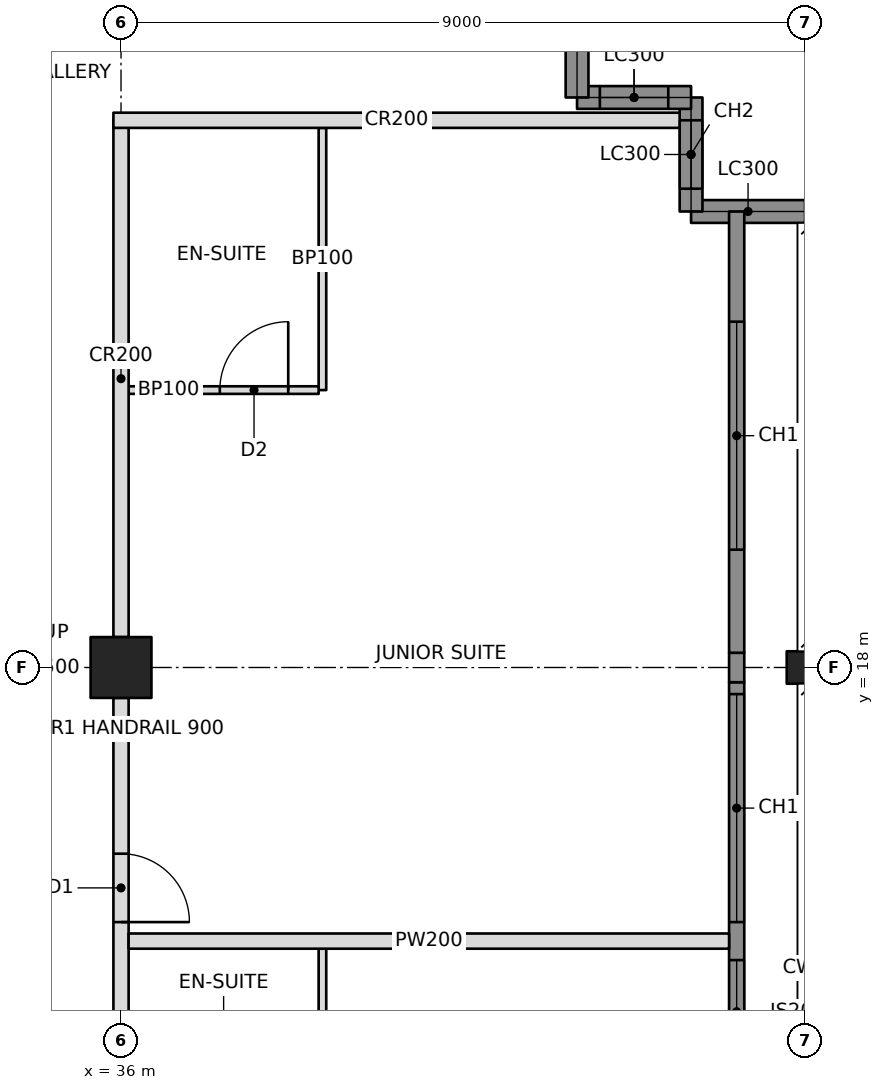
"""IFC4 building model, lengths in metres.
Left out: names, types, materials, properties, quantities, classifications, styles, units other than length and angle.
Written with IfcOpenShell. Run it as: python <this file> out.ifc"""

import sys

from ifc_helpers import new_model, si_unit, direction, frame, frame_2d, origin, origin_2d, place, context, subcontext, project, spatial, rectangle, hollow_rectangle, i_section, extrude, element, fill, save


model = new_model("IFC4")
c1 = context("Model", 3, precision=1e-05, world=origin(), true_north=direction((0.0, 1.0)))
c2 = subcontext(c1, "Body", "Model", "MODEL_VIEW")
j1 = project(units=[si_unit("LENGTHUNIT", "METRE"), si_unit("PLANEANGLEUNIT", "RADIAN")], contexts=[c1])
p1 = place(None, origin())
s1 = spatial("IfcSite", under=j1, at=p1, CompositionType="ELEMENT")
p2 = place(p1, origin())
s2 = spatial("IfcBuilding", under=s1, at=p2, CompositionType="ELEMENT")
p3 = place(p2, frame((0.0, 0.0, 211.4)))
s3 = spatial("IfcBuildingStorey", under=s2, at=p3, CompositionType="ELEMENT", Elevation=211.4)
p4 = place(p3, frame((36.0, 18.0, 0.0), z_axis=(0.0, 0.0, 1.0), x_axis=(0.0, 1.0, 0.0)))
e1 = element("IfcColumn", 1, at=p4, inside=s3, PredefinedType="COLUMN", context=c2, shape_type="SweptSolid", body=[
    extrude(hollow_rectangle(XDim=0.8, YDim=0.8, WallThickness=0.05, at=origin_2d()), origin(), (0.0, 0.0, 1.0), 3.4),
])
p5 = place(p3, frame((45.0, 18.0, 0.0), z_axis=(0.0, 0.0, 1.0), x_axis=(0.0, 1.0, 0.0)))
e2 = element("IfcColumn", 2, at=p5, inside=s3, PredefinedType="COLUMN", context=c2, shape_type="SweptSolid", body=[
    extrude(i_section(OverallWidth=0.427, OverallDepth=0.483, WebThickness=0.051, FlangeThickness=0.082, at=origin_2d()), origin(), (0.0, 0.0, 1.0), 3.4),
])
p6 = place(p3, frame((45.0, 24.0, 0.0), z_axis=(0.0, 0.0, 1.0), x_axis=(-1.0, 0.0, 0.0)))
e3 = element("IfcWall", 3, at=p6, inside=s3, PredefinedType="SOLIDWALL", context=c2, shape_type="SweptSolid", body=[
    extrude(rectangle(XDim=1.5, YDim=0.3, at=frame_2d((0.75, 0.0))), origin(), (0.0, 0.0, 1.0), 2.42),
])
p7 = place(p3, frame((43.5, 24.0, 0.0), z_axis=(0.0, 0.0, 1.0), x_axis=(0.0, 1.0, 0.0)))
e4 = element("IfcWall", 4, at=p7, inside=s3, PredefinedType="SOLIDWALL", context=c2, shape_type="SweptSolid", body=[
    extrude(rectangle(XDim=1.5, YDim=0.3, at=frame_2d((0.75, 0.0))), origin(), (0.0, 0.0, 1.0), 3.2),
])
p8 = place(p7, frame((0.3, 0.0, 0.6)))
e5 = element("IfcOpeningElement", 5, at=p8, cuts=e4, PredefinedType="OPENING", context=c2, shape_type="SweptSolid", body=[
    extrude(rectangle(XDim=0.9, YDim=2.2, at=frame_2d((0.45, 1.1))), frame((0.0, 0.16, 0.0), z_axis=(0.0, -1.0, 0.0), x_axis=(1.0, 0.0, 0.0)), (0.0, 0.0, 1.0), 0.32),
])
p9 = place(p3, frame((43.5, 25.5, 0.0), z_axis=(0.0, 0.0, 1.0), x_axis=(-1.0, 0.0, 0.0)))
e6 = element("IfcWall", 6, at=p9, inside=s3, PredefinedType="SOLIDWALL", context=c2, shape_type="SweptSolid", body=[
    extrude(rectangle(XDim=1.5, YDim=0.3, at=frame_2d((0.75, 0.0))), origin(), (0.0, 0.0, 1.0), 3.2),
])
p10 = place(p9, frame((0.3, 0.0, 0.6)))
e7 = element("IfcOpeningElement", 7, at=p10, cuts=e6, PredefinedType="OPENING", context=c2, shape_type="SweptSolid", body=[
    extrude(rectangle(XDim=0.9, YDim=2.2, at=frame_2d((0.45, 1.1))), frame((0.0, 0.16, 0.0), z_axis=(0.0, -1.0, 0.0), x_axis=(1.0, 0.0, 0.0)), (0.0, 0.0, 1.0), 0.32),
])
p11 = place(p3, frame((42.0, 25.5, 0.0), z_axis=(0.0, 0.0, 1.0), x_axis=(0.0, 1.0, 0.0)))
e8 = element("IfcWall", 8, at=p11, inside=s3, PredefinedType="SOLIDWALL", context=c2, shape_type="SweptSolid", body=[
    extrude(rectangle(XDim=1.5, YDim=0.3, at=frame_2d((0.75, 0.0))), origin(), (0.0, 0.0, 1.0), 2.42),
])
p12 = place(p3, frame((36.0, 10.8, 0.0), z_axis=(0.0, 0.0, 1.0), x_axis=(0.0, 1.0, 0.0)))
e9 = element("IfcWall", 9, at=p12, inside=s3, PredefinedType="PARTITIONING", context=c2, shape_type="SweptSolid", body=[
    extrude(rectangle(XDim=6.8, YDim=0.2, at=frame_2d((3.4, 0.0))), origin(), (0.0, 0.0, 1.0), 2.405),
])
p13 = place(p12, frame((0.25, 0.0, 0.0)))
e10 = element("IfcOpeningElement", 10, at=p13, cuts=e9, PredefinedType="OPENING", context=c2, shape_type="SweptSolid", body=[
    extrude(rectangle(XDim=0.9, YDim=2.1, at=frame_2d((0.45, 1.05))), frame((0.0, 0.11, 0.0), z_axis=(0.0, -1.0, 0.0), x_axis=(1.0, 0.0, 0.0)), (0.0, 0.0, 1.0), 0.22),
])
p14 = place(p12, frame((3.85, 0.0, 0.0)))
e11 = element("IfcOpeningElement", 11, at=p14, cuts=e9, PredefinedType="OPENING", context=c2, shape_type="SweptSolid", body=[
    extrude(rectangle(XDim=0.9, YDim=2.1, at=frame_2d((0.45, 1.05))), frame((0.0, 0.11, 0.0), z_axis=(0.0, -1.0, 0.0), x_axis=(1.0, 0.0, 0.0)), (0.0, 0.0, 1.0), 0.22),
])
p15 = place(p3, frame((36.0, 18.4, 0.0), z_axis=(0.0, 0.0, 1.0), x_axis=(0.0, 1.0, 0.0)))
e12 = element("IfcWall", 12, at=p15, inside=s3, PredefinedType="PARTITIONING", context=c2, shape_type="SweptSolid", body=[
    extrude(rectangle(XDim=6.8, YDim=0.2, at=frame_2d((3.4, 0.0))), origin(), (0.0, 0.0, 1.0), 2.405),
])
p16 = place(p3, frame((35.9, 25.2, 0.0), z_axis=(0.0, 0.0, 1.0), x_axis=(1.0, 0.0, 0.0)))
e13 = element("IfcWall", 13, at=p16, inside=s3, PredefinedType="PARTITIONING", context=c2, shape_type="SweptSolid", body=[
    extrude(rectangle(XDim=7.45, YDim=0.2, at=frame_2d((3.725, 0.0))), origin(), (0.0, 0.0, 1.0), 2.404),
])
p17 = place(p3, frame((36.1, 14.4, 0.0), z_axis=(0.0, 0.0, 1.0), x_axis=(1.0, 0.0, 0.0)))
e14 = element("IfcWall", 14, at=p17, inside=s3, PredefinedType="PARTITIONING", context=c2, shape_type="SweptSolid", body=[
    extrude(rectangle(XDim=7.9, YDim=0.2, at=frame_2d((3.95, 0.0))), origin(), (0.0, 0.0, 1.0), 2.404),
])
p18 = place(p3, frame((38.65, 12.25, 0.0), z_axis=(0.0, 0.0, 1.0), x_axis=(0.0, 1.0, 0.0)))
e15 = element("IfcWall", 15, at=p18, inside=s3, PredefinedType="PARTITIONING", context=c2, shape_type="SweptSolid", body=[
    extrude(rectangle(XDim=2.05, YDim=0.1, at=frame_2d((1.025, 0.0))), origin(), (0.0, 0.0, 1.0), 3.2),
])
p19 = place(p3, frame((38.65, 21.65, 0.0), z_axis=(0.0, 0.0, 1.0), x_axis=(0.0, 1.0, 0.0)))
e16 = element("IfcWall", 16, at=p19, inside=s3, PredefinedType="PARTITIONING", context=c2, shape_type="SweptSolid", body=[
    extrude(rectangle(XDim=3.45, YDim=0.1, at=frame_2d((1.725, 0.0))), origin(), (0.0, 0.0, 1.0), 3.2),
])
p20 = place(p3, frame((36.1, 21.65, 0.0), z_axis=(0.0, 0.0, 1.0), x_axis=(1.0, 0.0, 0.0)))
e17 = element("IfcWall", 17, at=p20, inside=s3, PredefinedType="PARTITIONING", context=c2, shape_type="SweptSolid", body=[
    extrude(rectangle(XDim=2.5, YDim=0.1, at=frame_2d((1.25, 0.0))), origin(), (0.0, 0.0, 1.0), 2.404),
])
p21 = place(p20, frame((1.2, 0.0, 0.0)))
e18 = element("IfcOpeningElement", 18, at=p21, cuts=e17, PredefinedType="OPENING", context=c2, shape_type="SweptSolid", body=[
    extrude(rectangle(XDim=0.9, YDim=2.1, at=frame_2d((0.45, 1.05))), frame((0.0, 0.06, 0.0), z_axis=(0.0, -1.0, 0.0), x_axis=(1.0, 0.0, 0.0)), (0.0, 0.0, 1.0), 0.12),
])
p22 = place(p3, frame((44.1, 9.135, 0.0), z_axis=(0.0, 0.0, 1.0), x_axis=(0.0, 1.0, 0.0)))
e19 = element("IfcWall", 19, at=p22, inside=s3, PredefinedType="SOLIDWALL", context=c2, shape_type="SweptSolid", body=[
    extrude(rectangle(XDim=8.671, YDim=0.2, at=frame_2d((4.335, 0.0))), origin(), (0.0, 0.0, 1.0), 3.2),
])
p23 = place(p22, frame((2.015, 0.0, 0.6)))
e20 = element("IfcOpeningElement", 20, at=p23, cuts=e19, PredefinedType="OPENING", context=c2, shape_type="SweptSolid", body=[
    extrude(rectangle(XDim=3.0, YDim=2.2, at=frame_2d((1.5, 1.1))), frame((0.0, 0.11, 0.0), z_axis=(0.0, -1.0, 0.0), x_axis=(1.0, 0.0, 0.0)), (0.0, 0.0, 1.0), 0.22),
])
p24 = place(p22, frame((5.515, 0.0, 0.6)))
e21 = element("IfcOpeningElement", 21, at=p24, cuts=e19, PredefinedType="OPENING", context=c2, shape_type="SweptSolid", body=[
    extrude(rectangle(XDim=3.0, YDim=2.2, at=frame_2d((1.5, 1.1))), frame((0.0, 0.11, 0.0), z_axis=(0.0, -1.0, 0.0), x_axis=(1.0, 0.0, 0.0)), (0.0, 0.0, 1.0), 0.22),
])
p25 = place(p3, frame((44.1, 17.806, 0.0), z_axis=(0.0, 0.0, 1.0), x_axis=(0.0, 1.0, 0.0)))
e22 = element("IfcWall", 22, at=p25, inside=s3, PredefinedType="SOLIDWALL", context=c2, shape_type="SweptSolid", body=[
    extrude(rectangle(XDim=0.388, YDim=0.2, at=frame_2d((0.194, 0.0))), origin(), (0.0, 0.0, 1.0), 2.404),
])
p26 = place(p3, frame((44.1, 18.194, 0.0), z_axis=(0.0, 0.0, 1.0), x_axis=(0.0, 1.0, 0.0)))
e23 = element("IfcWall", 23, at=p26, inside=s3, PredefinedType="SOLIDWALL", context=c2, shape_type="SweptSolid", body=[
    extrude(rectangle(XDim=5.806, YDim=0.2, at=frame_2d((2.903, 0.0))), origin(), (0.0, 0.0, 1.0), 3.2),
])
p27 = place(p26, frame((1.356, 0.0, 0.6)))
e24 = element("IfcOpeningElement", 24, at=p27, cuts=e23, PredefinedType="OPENING", context=c2, shape_type="SweptSolid", body=[
    extrude(rectangle(XDim=3.0, YDim=2.2, at=frame_2d((1.5, 1.1))), frame((0.0, 0.11, 0.0), z_axis=(0.0, -1.0, 0.0), x_axis=(1.0, 0.0, 0.0)), (0.0, 0.0, 1.0), 0.22),
])
p28 = place(p8, origin())
e25 = element("IfcWindow", 25, at=p28, inside=s3, PartitioningType="SINGLE_PANEL", PredefinedType="WINDOW", context=c2, shape_type="SweptSolid", body=[
    extrude(rectangle(XDim=0.9, YDim=2.2, at=frame_2d((0.45, 1.1))), frame((0.0, 0.03, 0.0), z_axis=(0.0, -1.0, 0.0), x_axis=(1.0, 0.0, 0.0)), (0.0, 0.0, 1.0), 0.06),
])
fill(e5, e25)
p29 = place(p10, origin())
e26 = element("IfcWindow", 26, at=p29, inside=s3, PartitioningType="SINGLE_PANEL", PredefinedType="WINDOW", context=c2, shape_type="SweptSolid", body=[
    extrude(rectangle(XDim=0.9, YDim=2.2, at=frame_2d((0.45, 1.1))), frame((0.0, 0.03, 0.0), z_axis=(0.0, -1.0, 0.0), x_axis=(1.0, 0.0, 0.0)), (0.0, 0.0, 1.0), 0.06),
])
fill(e7, e26)
p30 = place(p23, origin())
e27 = element("IfcWindow", 27, at=p30, inside=s3, PartitioningType="TRIPLE_PANEL_VERTICAL", PredefinedType="WINDOW", context=c2, shape_type="SweptSolid", body=[
    extrude(rectangle(XDim=3.0, YDim=2.2, at=frame_2d((1.5, 1.1))), frame((0.0, 0.03, 0.0), z_axis=(0.0, -1.0, 0.0), x_axis=(1.0, 0.0, 0.0)), (0.0, 0.0, 1.0), 0.06),
])
fill(e20, e27)
p31 = place(p24, origin())
e28 = element("IfcWindow", 28, at=p31, inside=s3, PartitioningType="TRIPLE_PANEL_VERTICAL", PredefinedType="WINDOW", context=c2, shape_type="SweptSolid", body=[
    extrude(rectangle(XDim=3.0, YDim=2.2, at=frame_2d((1.5, 1.1))), frame((0.0, 0.03, 0.0), z_axis=(0.0, -1.0, 0.0), x_axis=(1.0, 0.0, 0.0)), (0.0, 0.0, 1.0), 0.06),
])
fill(e21, e28)
p32 = place(p27, origin())
e29 = element("IfcWindow", 29, at=p32, inside=s3, PartitioningType="TRIPLE_PANEL_VERTICAL", PredefinedType="WINDOW", context=c2, shape_type="SweptSolid", body=[
    extrude(rectangle(XDim=3.0, YDim=2.2, at=frame_2d((1.5, 1.1))), frame((0.0, 0.03, 0.0), z_axis=(0.0, -1.0, 0.0), x_axis=(1.0, 0.0, 0.0)), (0.0, 0.0, 1.0), 0.06),
])
fill(e24, e29)
p33 = place(p21, origin())
e30 = element("IfcDoor", 30, at=p33, inside=s3, OperationType="SINGLE_SWING_RIGHT", PredefinedType="DOOR", context=c2, shape_type="SweptSolid", body=[
    extrude(rectangle(XDim=0.9, YDim=2.1, at=frame_2d((0.45, 1.05))), frame((0.0, 0.025, 0.0), z_axis=(0.0, -1.0, 0.0), x_axis=(1.0, 0.0, 0.0)), (0.0, 0.0, 1.0), 0.05),
])
fill(e18, e30)
p34 = place(p14, frame((0.9, 0.0, 0.0), z_axis=(0.0, 0.0, 1.0), x_axis=(-1.0, 0.0, 0.0)))
e31 = element("IfcDoor", 31, at=p34, inside=s3, OperationType="SINGLE_SWING_RIGHT", PredefinedType="DOOR", context=c2, shape_type="SweptSolid", body=[
    extrude(rectangle(XDim=0.9, YDim=2.1, at=frame_2d((0.45, 1.05))), frame((0.0, 0.025, 0.0), z_axis=(0.0, -1.0, 0.0), x_axis=(1.0, 0.0, 0.0)), (0.0, 0.0, 1.0), 0.05),
])
fill(e11, e31)
save(model, sys.argv[1])
